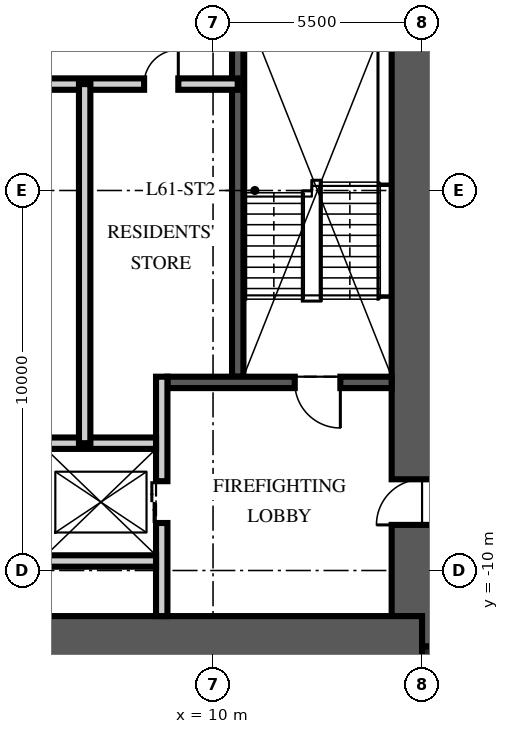
"""IFC4 building model, lengths in metres.
Left out: names, types, materials, properties, quantities, classifications, styles, units other than length and angle.
Written with IfcOpenShell. Run it as: python <this file> out.ifc"""

import sys

from ifc_helpers import new_model, si_unit, direction, frame, frame_2d, origin, origin_2d, place, context, subcontext, project, spatial, rectangle, extrude, element, fill, save


model = new_model("IFC4")
c1 = context("Model", 3, precision=1e-05, world=origin(), true_north=direction((0.0, 1.0)))
c2 = subcontext(c1, "Body", "Model", "MODEL_VIEW")
j1 = project(units=[si_unit("LENGTHUNIT", "METRE"), si_unit("PLANEANGLEUNIT", "RADIAN")], contexts=[c1])
p1 = place(None, origin())
s1 = spatial("IfcSite", under=j1, at=p1, CompositionType="ELEMENT")
p2 = place(p1, origin())
s2 = spatial("IfcBuilding", under=s1, at=p2, CompositionType="ELEMENT")
p3 = place(p2, frame((0.0, 0.0, 244.5)))
s3 = spatial("IfcBuildingStorey", under=s2, at=p3, CompositionType="ELEMENT", Elevation=244.5)
p4 = place(p3, frame((15.5, -12.0, -0.25), z_axis=(0.0, 0.0, 1.0), x_axis=(0.0, 1.0, 0.0)))
e1 = element("IfcWall", 1, at=p4, inside=s3, PredefinedType="SHEAR", context=c2, shape_type="SweptSolid", body=[
    extrude(rectangle(XDim=24.0, YDim=1.6, at=frame_2d((12.0, 0.0))), origin(), (0.0, 0.0, 1.0), 3.75),
])
p5 = place(p4, frame((3.2, 0.0, 0.25)))
e2 = element("IfcOpeningElement", 2, at=p5, cuts=e1, PredefinedType="OPENING", context=c2, shape_type="SweptSolid", body=[
    extrude(rectangle(XDim=1.2, YDim=2.1, at=frame_2d((0.6, 1.05))), frame((0.0, 0.81, 0.0), z_axis=(0.0, -1.0, 0.0), x_axis=(1.0, 0.0, 0.0)), (0.0, 0.0, 1.0), 1.62),
])
p6 = place(p4, frame((19.3, 0.0, 0.25)))
e3 = element("IfcOpeningElement", 3, at=p6, cuts=e1, PredefinedType="OPENING", context=c2, shape_type="SweptSolid", body=[
    extrude(rectangle(XDim=1.8, YDim=2.1, at=frame_2d((0.9, 1.05))), frame((0.0, 0.81, 0.0), z_axis=(0.0, -1.0, 0.0), x_axis=(1.0, 0.0, 0.0)), (0.0, 0.0, 1.0), 1.62),
])
p7 = place(p3, frame((-15.5, -12.0, -0.25), z_axis=(0.0, 0.0, 1.0), x_axis=(1.0, 0.0, 0.0)))
e4 = element("IfcWall", 4, at=p7, inside=s3, PredefinedType="SHEAR", context=c2, shape_type="SweptSolid", body=[
    extrude(rectangle(XDim=31.0, YDim=1.6, at=frame_2d((15.5, 0.0))), origin(), (0.0, 0.0, 1.0), 3.75),
])
p8 = place(p3, frame((15.9, -12.4, -0.25), z_axis=(0.0, 0.0, 1.0), x_axis=(1.0, 0.0, 0.0)))
e5 = element("IfcColumn", 5, at=p8, inside=s3, PredefinedType="COLUMN", context=c2, shape_type="SweptSolid", body=[
    extrude(rectangle(XDim=0.8, YDim=0.8, at=origin_2d()), origin(), (0.0, 0.0, 1.0), 3.75),
])
p9 = place(p3, frame((10.65, -4.9, 0.0), z_axis=(0.0, 0.0, 1.0), x_axis=(0.0, 1.0, 0.0)))
e6 = element("IfcWall", 6, at=p9, inside=s3, PredefinedType="SOLIDWALL", context=c2, shape_type="SweptSolid", body=[
    extrude(rectangle(XDim=10.1, YDim=0.3, at=frame_2d((5.05, 0.0))), origin(), (0.0, 0.0, 1.0), 3.5),
])
p10 = place(p3, frame((14.7, -5.05, 0.0), z_axis=(0.0, 0.0, 1.0), x_axis=(-1.0, 0.0, 0.0)))
e7 = element("IfcWall", 7, at=p10, inside=s3, PredefinedType="SOLIDWALL", context=c2, shape_type="SweptSolid", body=[
    extrude(rectangle(XDim=5.9, YDim=0.3, at=frame_2d((2.95, 0.0))), origin(), (0.0, 0.0, 1.0), 3.5),
])
p11 = place(p10, frame((1.35, 0.0, 0.0)))
e8 = element("IfcOpeningElement", 8, at=p11, cuts=e7, PredefinedType="OPENING", context=c2, shape_type="SweptSolid", body=[
    extrude(rectangle(XDim=1.2, YDim=2.1, at=frame_2d((0.6, 1.05))), frame((0.0, 0.16, 0.0), z_axis=(0.0, -1.0, 0.0), x_axis=(1.0, 0.0, 0.0)), (0.0, 0.0, 1.0), 0.32),
])
p12 = place(p3, frame((8.65, -11.2, 0.0), z_axis=(0.0, 0.0, 1.0), x_axis=(0.0, 1.0, 0.0)))
e9 = element("IfcWall", 9, at=p12, inside=s3, PredefinedType="PARTITIONING", context=c2, shape_type="SweptSolid", body=[
    extrude(rectangle(XDim=6.3, YDim=0.3, at=frame_2d((3.15, 0.0))), origin(), (0.0, 0.0, 1.0), 3.5),
])
p13 = place(p12, frame((2.45, 0.0, 0.0)))
e10 = element("IfcOpeningElement", 10, at=p13, cuts=e9, PredefinedType="OPENING", context=c2, shape_type="SweptSolid", body=[
    extrude(rectangle(XDim=1.1, YDim=2.1, at=frame_2d((0.55, 1.05))), frame((0.0, 0.16, 0.0), z_axis=(0.0, -1.0, 0.0), x_axis=(1.0, 0.0, 0.0)), (0.0, 0.0, 1.0), 0.32),
])
p14 = place(p3, frame((-8.5, -6.65, 0.0), z_axis=(0.0, 0.0, 1.0), x_axis=(1.0, 0.0, 0.0)))
e11 = element("IfcWall", 11, at=p14, inside=s3, PredefinedType="PARTITIONING", context=c2, shape_type="SweptSolid", body=[
    extrude(rectangle(XDim=17.0, YDim=0.3, at=frame_2d((8.5, 0.0))), origin(), (0.0, 0.0, 1.0), 3.5),
])
p15 = place(p14, frame((7.8, 0.0, 0.0)))
e12 = element("IfcOpeningElement", 12, at=p15, cuts=e11, PredefinedType="OPENING", context=c2, shape_type="SweptSolid", body=[
    extrude(rectangle(XDim=1.3, YDim=2.4, at=frame_2d((0.65, 1.2))), frame((0.0, 0.16, 0.0), z_axis=(0.0, -1.0, 0.0), x_axis=(1.0, 0.0, 0.0)), (0.0, 0.0, 1.0), 0.32),
])
p16 = place(p14, frame((5.65, 0.0, 0.0)))
e13 = element("IfcOpeningElement", 13, at=p16, cuts=e11, PredefinedType="OPENING", context=c2, shape_type="SweptSolid", body=[
    extrude(rectangle(XDim=0.9, YDim=2.1, at=frame_2d((0.45, 1.05))), frame((0.0, 0.16, 0.0), z_axis=(0.0, -1.0, 0.0), x_axis=(1.0, 0.0, 0.0)), (0.0, 0.0, 1.0), 0.32),
])
p17 = place(p14, frame((10.4, 0.0, 0.0)))
e14 = element("IfcOpeningElement", 14, at=p17, cuts=e11, PredefinedType="OPENING", context=c2, shape_type="SweptSolid", body=[
    extrude(rectangle(XDim=0.9, YDim=2.1, at=frame_2d((0.45, 1.05))), frame((0.0, 0.16, 0.0), z_axis=(0.0, -1.0, 0.0), x_axis=(1.0, 0.0, 0.0)), (0.0, 0.0, 1.0), 0.32),
])
p18 = place(p3, frame((5.6, -9.75, 0.0), z_axis=(0.0, 0.0, 1.0), x_axis=(1.0, 0.0, 0.0)))
e15 = element("IfcWall", 15, at=p18, inside=s3, PredefinedType="PARTITIONING", context=c2, shape_type="SweptSolid", body=[
    extrude(rectangle(XDim=2.9, YDim=0.3, at=frame_2d((1.45, 0.0))), origin(), (0.0, 0.0, 1.0), 3.5),
])
p19 = place(p3, frame((-10.65, 2.8, 0.0), z_axis=(0.0, 0.0, 1.0), x_axis=(1.0, 0.0, 0.0)))
e16 = element("IfcWall", 16, at=p19, inside=s3, PredefinedType="PARTITIONING", context=c2, shape_type="SweptSolid", body=[
    extrude(rectangle(XDim=21.3, YDim=0.3, at=frame_2d((10.65, 0.0))), origin(), (0.0, 0.0, 1.0), 3.5),
])
p20 = place(p19, frame((10.05, 0.0, 0.0)))
e17 = element("IfcOpeningElement", 17, at=p20, cuts=e16, PredefinedType="OPENING", context=c2, shape_type="SweptSolid", body=[
    extrude(rectangle(XDim=1.2, YDim=2.1, at=frame_2d((0.6, 1.05))), frame((0.0, 0.16, 0.0), z_axis=(0.0, -1.0, 0.0), x_axis=(1.0, 0.0, 0.0)), (0.0, 0.0, 1.0), 0.32),
])
p21 = place(p19, frame((1.493, 0.0, 0.0)))
e18 = element("IfcOpeningElement", 18, at=p21, cuts=e16, PredefinedType="OPENING", context=c2, shape_type="SweptSolid", body=[
    extrude(rectangle(XDim=0.9, YDim=2.1, at=frame_2d((0.45, 1.05))), frame((0.0, 0.16, 0.0), z_axis=(0.0, -1.0, 0.0), x_axis=(1.0, 0.0, 0.0)), (0.0, 0.0, 1.0), 0.32),
])
p22 = place(p19, frame((18.836, 0.0, 0.0)))
e19 = element("IfcOpeningElement", 19, at=p22, cuts=e16, PredefinedType="OPENING", context=c2, shape_type="SweptSolid", body=[
    extrude(rectangle(XDim=0.9, YDim=2.1, at=frame_2d((0.45, 1.05))), frame((0.0, 0.16, 0.0), z_axis=(0.0, -1.0, 0.0), x_axis=(1.0, 0.0, 0.0)), (0.0, 0.0, 1.0), 0.32),
])
p23 = place(p3, frame((6.622, -6.65, 0.0), z_axis=(0.0, 0.0, 1.0), x_axis=(0.0, 1.0, 0.0)))
e20 = element("IfcWall", 20, at=p23, inside=s3, PredefinedType="PARTITIONING", context=c2, shape_type="SweptSolid", body=[
    extrude(rectangle(XDim=9.45, YDim=0.3, at=frame_2d((4.725, 0.0))), origin(), (0.0, 0.0, 1.0), 3.5),
])
p24 = place(p11, origin())
e21 = element("IfcDoor", 21, at=p24, inside=s3, OperationType="SINGLE_SWING_LEFT", PredefinedType="DOOR", context=c2, shape_type="SweptSolid", body=[
    extrude(rectangle(XDim=1.2, YDim=2.1, at=frame_2d((0.6, 1.05))), frame((0.0, 0.025, 0.0), z_axis=(0.0, -1.0, 0.0), x_axis=(1.0, 0.0, 0.0)), (0.0, 0.0, 1.0), 0.05),
])
fill(e8, e21)
p25 = place(p5, origin())
e22 = element("IfcDoor", 22, at=p25, inside=s3, OperationType="SINGLE_SWING_LEFT", PredefinedType="DOOR", context=c2, shape_type="SweptSolid", body=[
    extrude(rectangle(XDim=1.2, YDim=2.1, at=frame_2d((0.6, 1.05))), frame((0.0, 0.025, 0.0), z_axis=(0.0, -1.0, 0.0), x_axis=(1.0, 0.0, 0.0)), (0.0, 0.0, 1.0), 0.05),
])
fill(e2, e22)
p26 = place(p13, origin())
e23 = element("IfcDoor", 23, at=p26, inside=s3, OperationType="DOUBLE_DOOR_SLIDING", PredefinedType="DOOR", context=c2, shape_type="SweptSolid", body=[
    extrude(rectangle(XDim=1.1, YDim=2.1, at=frame_2d((0.55, 1.05))), frame((0.0, 0.025, 0.0), z_axis=(0.0, -1.0, 0.0), x_axis=(1.0, 0.0, 0.0)), (0.0, 0.0, 1.0), 0.05),
])
fill(e10, e23)
p27 = place(p22, origin())
e24 = element("IfcDoor", 24, at=p27, inside=s3, OperationType="SINGLE_SWING_RIGHT", PredefinedType="DOOR", context=c2, shape_type="SweptSolid", body=[
    extrude(rectangle(XDim=0.9, YDim=2.1, at=frame_2d((0.45, 1.05))), frame((0.0, 0.025, 0.0), z_axis=(0.0, -1.0, 0.0), x_axis=(1.0, 0.0, 0.0)), (0.0, 0.0, 1.0), 0.05),
])
fill(e19, e24)
save(model, sys.argv[1])
